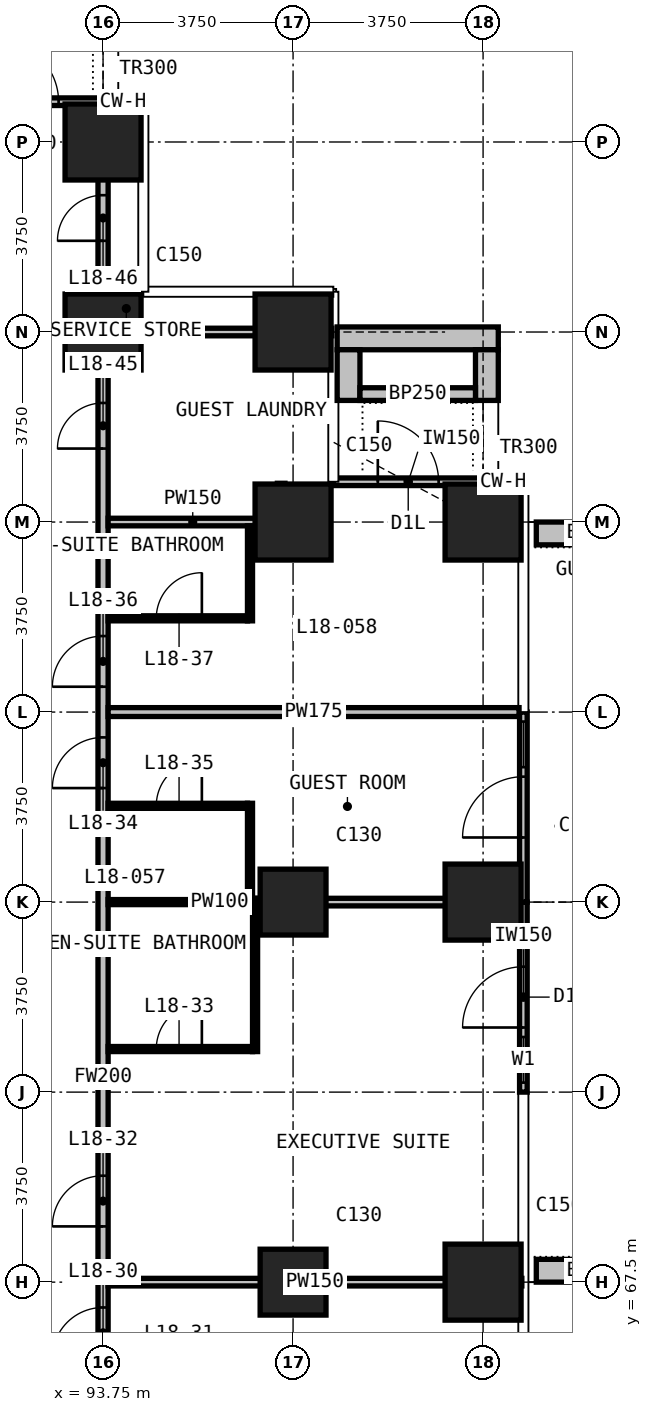
"""IFC4 building model, lengths in metres.
Left out: names, types, materials, properties, quantities, classifications, styles, units other than length and angle.
Written with IfcOpenShell. Run it as: python <this file> out.ifc"""

import sys

from ifc_helpers import new_model, si_unit, direction, frame, frame_2d, origin, origin_2d, place, context, subcontext, project, spatial, rectangle, extrude, element, fill, save


model = new_model("IFC4")
c1 = context("Model", 3, precision=1e-05, world=origin(), true_north=direction((0.0, 1.0)))
c2 = subcontext(c1, "Body", "Model", "MODEL_VIEW")
j1 = project(units=[si_unit("LENGTHUNIT", "METRE"), si_unit("PLANEANGLEUNIT", "RADIAN")], contexts=[c1])
p1 = place(None, origin())
s1 = spatial("IfcSite", under=j1, at=p1, CompositionType="ELEMENT")
p2 = place(p1, origin())
s2 = spatial("IfcBuilding", under=s1, at=p2, CompositionType="ELEMENT")
p3 = place(p2, frame((0.0, 0.0, 79.1)))
s3 = spatial("IfcBuildingStorey", under=s2, at=p3, CompositionType="ELEMENT", Elevation=79.1)
for number, where, z_axis, x_axis in (
    (1, (93.75, 86.25, 0.0), (0.0, 0.0, 1.0), (1.0, 0.0, 0.0)),
    (2, (93.75, 90.0, 0.0), (0.0, 0.0, 1.0), (1.0, 0.0, 0.0)),
):
    element("IfcColumn", number, at=place(p3, frame(where, z_axis=z_axis, x_axis=x_axis)), inside=s3, PredefinedType="COLUMN", context=c2, shape_type="SweptSolid", body=[
        extrude(rectangle(XDim=1.5, YDim=1.5, at=origin_2d()), origin(), (0.0, 0.0, 1.0), 3.3),
    ])
for number, where, z_axis, x_axis in (
    (3, (97.5, 67.5, 0.0), (0.0, 0.0, 1.0), (1.0, 0.0, 0.0)),
    (4, (97.5, 75.0, 0.0), (0.0, 0.0, 1.0), (1.0, 0.0, 0.0)),
):
    element("IfcColumn", number, at=place(p3, frame(where, z_axis=z_axis, x_axis=x_axis)), inside=s3, PredefinedType="COLUMN", context=c2, shape_type="SweptSolid", body=[
        extrude(rectangle(XDim=1.3, YDim=1.3, at=origin_2d()), origin(), (0.0, 0.0, 1.0), 3.3),
    ])
for number, where, z_axis, x_axis in (
    (5, (97.5, 82.5, 0.0), (0.0, 0.0, 1.0), (1.0, 0.0, 0.0)),
    (6, (97.5, 86.25, 0.0), (0.0, 0.0, 1.0), (1.0, 0.0, 0.0)),
    (7, (101.25, 67.5, 0.0), (0.0, 0.0, 1.0), (1.0, 0.0, 0.0)),
    (8, (101.25, 75.0, 0.0), (0.0, 0.0, 1.0), (1.0, 0.0, 0.0)),
    (9, (101.25, 82.5, 0.0), (0.0, 0.0, 1.0), (1.0, 0.0, 0.0)),
):
    element("IfcColumn", number, at=place(p3, frame(where, z_axis=z_axis, x_axis=x_axis)), inside=s3, PredefinedType="COLUMN", context=c2, shape_type="SweptSolid", body=[
        extrude(rectangle(XDim=1.5, YDim=1.5, at=origin_2d()), origin(), (0.0, 0.0, 1.0), 3.3),
    ])
p4 = place(p3, frame((102.045, 71.25, 0.0), z_axis=(0.0, 0.0, 1.0), x_axis=(0.0, 1.0, 0.0)))
e10 = element("IfcWall", 10, at=p4, inside=s3, PredefinedType="SOLIDWALL", context=c2, shape_type="SweptSolid", body=[
    extrude(rectangle(XDim=3.75, YDim=0.15, at=frame_2d((1.875, 0.0))), origin(), (0.0, 0.0, 1.0), 3.0),
])
p5 = place(p4, frame((0.188, 0.0, 0.1)))
e11 = element("IfcOpeningElement", 11, at=p5, cuts=e10, PredefinedType="OPENING", context=c2, shape_type="SweptSolid", body=[
    extrude(rectangle(XDim=0.9, YDim=2.4, at=frame_2d((0.45, 1.2))), frame((0.0, 0.085, 0.0), z_axis=(0.0, -1.0, 0.0), x_axis=(1.0, 0.0, 0.0)), (0.0, 0.0, 1.0), 0.17),
])
p6 = place(p4, frame((1.275, 0.0, 0.0)))
e12 = element("IfcOpeningElement", 12, at=p6, cuts=e10, PredefinedType="OPENING", context=c2, shape_type="SweptSolid", body=[
    extrude(rectangle(XDim=1.2, YDim=2.4, at=frame_2d((0.6, 1.2))), frame((0.0, 0.085, 0.0), z_axis=(0.0, -1.0, 0.0), x_axis=(1.0, 0.0, 0.0)), (0.0, 0.0, 1.0), 0.17),
])
p7 = place(p3, frame((102.045, 75.0, 0.0), z_axis=(0.0, 0.0, 1.0), x_axis=(0.0, 1.0, 0.0)))
e13 = element("IfcWall", 13, at=p7, inside=s3, PredefinedType="SOLIDWALL", context=c2, shape_type="SweptSolid", body=[
    extrude(rectangle(XDim=3.75, YDim=0.15, at=frame_2d((1.875, 0.0))), origin(), (0.0, 0.0, 1.0), 3.0),
])
p8 = place(p7, frame((1.275, 0.0, 0.0)))
e14 = element("IfcOpeningElement", 14, at=p8, cuts=e13, PredefinedType="OPENING", context=c2, shape_type="SweptSolid", body=[
    extrude(rectangle(XDim=1.2, YDim=2.4, at=frame_2d((0.6, 1.2))), frame((0.0, 0.085, 0.0), z_axis=(0.0, -1.0, 0.0), x_axis=(1.0, 0.0, 0.0)), (0.0, 0.0, 1.0), 0.17),
])
p9 = place(p7, frame((2.663, 0.0, 0.1)))
e15 = element("IfcOpeningElement", 15, at=p9, cuts=e13, PredefinedType="OPENING", context=c2, shape_type="SweptSolid", body=[
    extrude(rectangle(XDim=0.9, YDim=2.4, at=frame_2d((0.45, 1.2))), frame((0.0, 0.085, 0.0), z_axis=(0.0, -1.0, 0.0), x_axis=(1.0, 0.0, 0.0)), (0.0, 0.0, 1.0), 0.17),
])
p10 = place(p3, frame((98.295, 83.295, 0.0), z_axis=(0.0, 0.0, 1.0), x_axis=(1.0, 0.0, 0.0)))
e16 = element("IfcWall", 16, at=p10, inside=s3, PredefinedType="SOLIDWALL", context=c2, shape_type="SweptSolid", body=[
    extrude(rectangle(XDim=2.955, YDim=0.15, at=frame_2d((1.478, 0.0))), origin(), (0.0, 0.0, 1.0), 3.0),
])
p11 = place(p10, frame((0.877, 0.0, 0.0)))
e17 = element("IfcOpeningElement", 17, at=p11, cuts=e16, PredefinedType="OPENING", context=c2, shape_type="SweptSolid", body=[
    extrude(rectangle(XDim=1.2, YDim=2.0, at=frame_2d((0.6, 1.0))), frame((0.0, 0.085, 0.0), z_axis=(0.0, -1.0, 0.0), x_axis=(1.0, 0.0, 0.0)), (0.0, 0.0, 1.0), 0.17),
])
p12 = place(p3, frame((90.795, 90.795, 0.0), z_axis=(0.0, 0.0, 1.0), x_axis=(1.0, 0.0, 0.0)))
e18 = element("IfcWall", 18, at=p12, inside=s3, PredefinedType="SOLIDWALL", context=c2, shape_type="SweptSolid", body=[
    extrude(rectangle(XDim=2.955, YDim=0.15, at=frame_2d((1.478, 0.0))), origin(), (0.0, 0.0, 1.0), 3.0),
])
p13 = place(p12, frame((0.877, 0.0, 0.0)))
e19 = element("IfcOpeningElement", 19, at=p13, cuts=e18, PredefinedType="OPENING", context=c2, shape_type="SweptSolid", body=[
    extrude(rectangle(XDim=1.2, YDim=2.4, at=frame_2d((0.6, 1.2))), frame((0.0, 0.085, 0.0), z_axis=(0.0, -1.0, 0.0), x_axis=(1.0, 0.0, 0.0)), (0.0, 0.0, 1.0), 0.17),
])
for number, where, z_axis, x_axis in (
    (20, (102.3, 67.725, 0.0), (0.0, 0.0, 1.0), (1.0, 0.0, 0.0)),
    (21, (102.3, 82.275, 0.0), (0.0, 0.0, 1.0), (1.0, 0.0, 0.0)),
):
    element("IfcWall", number, at=place(p3, frame(where, z_axis=z_axis, x_axis=x_axis)), inside=s3, PredefinedType="USERDEFINED", context=c2, shape_type="SweptSolid", body=[
        extrude(rectangle(XDim=2.35, YDim=0.45, at=frame_2d((1.175, 0.0))), origin(), (0.0, 0.0, 1.0), 1.1),
    ])
p14 = place(p3, frame((98.37, 86.125, 0.0), z_axis=(0.0, 0.0, 1.0), x_axis=(1.0, 0.0, 0.0)))
e22 = element("IfcWall", 22, at=p14, inside=s3, PredefinedType="USERDEFINED", context=c2, shape_type="SweptSolid", body=[
    extrude(rectangle(XDim=3.18, YDim=0.45, at=frame_2d((1.59, 0.0))), origin(), (0.0, 0.0, 1.0), 1.1),
])
for number, where, z_axis, x_axis in (
    (23, (98.595, 84.9, 0.0), (0.0, 0.0, 1.0), (0.0, 1.0, 0.0)),
    (24, (101.325, 84.9, 0.0), (0.0, 0.0, 1.0), (0.0, 1.0, 0.0)),
):
    element("IfcWall", number, at=place(p3, frame(where, z_axis=z_axis, x_axis=x_axis)), inside=s3, PredefinedType="USERDEFINED", context=c2, shape_type="SweptSolid", body=[
        extrude(rectangle(XDim=1.0, YDim=0.45, at=frame_2d((0.5, 0.0))), origin(), (0.0, 0.0, 1.0), 1.1),
    ])
p15 = place(p3, frame((98.82, 85.025, 0.0), z_axis=(0.0, 0.0, 1.0), x_axis=(1.0, 0.0, 0.0)))
e25 = element("IfcWall", 25, at=p15, inside=s3, PredefinedType="USERDEFINED", context=c2, shape_type="SweptSolid", body=[
    extrude(rectangle(XDim=2.28, YDim=0.25, at=frame_2d((1.14, 0.0))), origin(), (0.0, 0.0, 1.0), 1.0),
])
p16 = place(p3, frame((93.75, 52.4, 0.0), z_axis=(0.0, 0.0, 1.0), x_axis=(0.0, 1.0, 0.0)))
e26 = element("IfcWall", 26, at=p16, inside=s3, PredefinedType="PARTITIONING", context=c2, shape_type="SweptSolid", body=[
    extrude(rectangle(XDim=38.31, YDim=0.2, at=frame_2d((19.155, 0.0))), origin(), (0.0, 0.0, 1.0), 3.0),
])
p17 = place(p16, frame((5.5, 0.0, 0.0)))
e27 = element("IfcOpeningElement", 27, at=p17, cuts=e26, PredefinedType="OPENING", context=c2, shape_type="SweptSolid", body=[
    extrude(rectangle(XDim=1.0, YDim=2.2, at=frame_2d((0.5, 1.1))), frame((0.0, 0.11, 0.0), z_axis=(0.0, -1.0, 0.0), x_axis=(1.0, 0.0, 0.0)), (0.0, 0.0, 1.0), 0.22),
])
p18 = place(p16, frame((8.1, 0.0, 0.0)))
e28 = element("IfcOpeningElement", 28, at=p18, cuts=e26, PredefinedType="OPENING", context=c2, shape_type="SweptSolid", body=[
    extrude(rectangle(XDim=1.0, YDim=2.2, at=frame_2d((0.5, 1.1))), frame((0.0, 0.11, 0.0), z_axis=(0.0, -1.0, 0.0), x_axis=(1.0, 0.0, 0.0)), (0.0, 0.0, 1.0), 0.22),
])
p19 = place(p16, frame((13.6, 0.0, 0.0)))
e29 = element("IfcOpeningElement", 29, at=p19, cuts=e26, PredefinedType="OPENING", context=c2, shape_type="SweptSolid", body=[
    extrude(rectangle(XDim=1.0, YDim=2.2, at=frame_2d((0.5, 1.1))), frame((0.0, 0.11, 0.0), z_axis=(0.0, -1.0, 0.0), x_axis=(1.0, 0.0, 0.0)), (0.0, 0.0, 1.0), 0.22),
])
p20 = place(p16, frame((16.2, 0.0, 0.0)))
e30 = element("IfcOpeningElement", 30, at=p20, cuts=e26, PredefinedType="OPENING", context=c2, shape_type="SweptSolid", body=[
    extrude(rectangle(XDim=1.0, YDim=2.2, at=frame_2d((0.5, 1.1))), frame((0.0, 0.11, 0.0), z_axis=(0.0, -1.0, 0.0), x_axis=(1.0, 0.0, 0.0)), (0.0, 0.0, 1.0), 0.22),
])
p21 = place(p16, frame((24.85, 0.0, 0.0)))
e31 = element("IfcOpeningElement", 31, at=p21, cuts=e26, PredefinedType="OPENING", context=c2, shape_type="SweptSolid", body=[
    extrude(rectangle(XDim=1.0, YDim=2.2, at=frame_2d((0.5, 1.1))), frame((0.0, 0.11, 0.0), z_axis=(0.0, -1.0, 0.0), x_axis=(1.0, 0.0, 0.0)), (0.0, 0.0, 1.0), 0.22),
])
p22 = place(p16, frame((26.85, 0.0, 0.0)))
e32 = element("IfcOpeningElement", 32, at=p22, cuts=e26, PredefinedType="OPENING", context=c2, shape_type="SweptSolid", body=[
    extrude(rectangle(XDim=1.0, YDim=2.2, at=frame_2d((0.5, 1.1))), frame((0.0, 0.11, 0.0), z_axis=(0.0, -1.0, 0.0), x_axis=(1.0, 0.0, 0.0)), (0.0, 0.0, 1.0), 0.22),
])
p23 = place(p16, frame((31.55, 0.0, 0.0)))
e33 = element("IfcOpeningElement", 33, at=p23, cuts=e26, PredefinedType="OPENING", context=c2, shape_type="SweptSolid", body=[
    extrude(rectangle(XDim=0.9, YDim=2.2, at=frame_2d((0.45, 1.1))), frame((0.0, 0.11, 0.0), z_axis=(0.0, -1.0, 0.0), x_axis=(1.0, 0.0, 0.0)), (0.0, 0.0, 1.0), 0.22),
])
p24 = place(p16, frame((35.65, 0.0, 0.0)))
e34 = element("IfcOpeningElement", 34, at=p24, cuts=e26, PredefinedType="OPENING", context=c2, shape_type="SweptSolid", body=[
    extrude(rectangle(XDim=0.9, YDim=2.2, at=frame_2d((0.45, 1.1))), frame((0.0, 0.11, 0.0), z_axis=(0.0, -1.0, 0.0), x_axis=(1.0, 0.0, 0.0)), (0.0, 0.0, 1.0), 0.22),
])
p25 = place(p3, frame((93.85, 78.75, 0.0), z_axis=(0.0, 0.0, 1.0), x_axis=(1.0, 0.0, 0.0)))
e35 = element("IfcWall", 35, at=p25, inside=s3, PredefinedType="PARTITIONING", context=c2, shape_type="SweptSolid", body=[
    extrude(rectangle(XDim=8.11, YDim=0.175, at=frame_2d((4.055, 0.0))), origin(), (0.0, 0.0, 1.0), 3.0),
])
p26 = place(p3, frame((93.85, 67.5, 0.0), z_axis=(0.0, 0.0, 1.0), x_axis=(1.0, 0.0, 0.0)))
e36 = element("IfcWall", 36, at=p26, inside=s3, PredefinedType="PARTITIONING", context=c2, shape_type="SweptSolid", body=[
    extrude(rectangle(XDim=8.165, YDim=0.15, at=frame_2d((4.083, 0.0))), origin(), (0.0, 0.0, 1.0), 3.0),
])
p27 = place(p3, frame((96.8, 75.0, 0.0), z_axis=(0.0, 0.0, 1.0), x_axis=(1.0, 0.0, 0.0)))
e37 = element("IfcWall", 37, at=p27, inside=s3, PredefinedType="PARTITIONING", context=c2, shape_type="SweptSolid", body=[
    extrude(rectangle(XDim=5.16, YDim=0.15, at=frame_2d((2.58, 0.0))), origin(), (0.0, 0.0, 1.0), 3.0),
])
p28 = place(p3, frame((93.85, 82.5, 0.0), z_axis=(0.0, 0.0, 1.0), x_axis=(1.0, 0.0, 0.0)))
e38 = element("IfcWall", 38, at=p28, inside=s3, PredefinedType="PARTITIONING", context=c2, shape_type="SweptSolid", body=[
    extrude(rectangle(XDim=3.34, YDim=0.15, at=frame_2d((1.67, 0.0))), origin(), (0.0, 0.0, 1.0), 3.0),
])
p29 = place(p3, frame((93.85, 86.25, 0.0), z_axis=(0.0, 0.0, 1.0), x_axis=(1.0, 0.0, 0.0)))
e39 = element("IfcWall", 39, at=p29, inside=s3, PredefinedType="PARTITIONING", context=c2, shape_type="SweptSolid", body=[
    extrude(rectangle(XDim=4.415, YDim=0.15, at=frame_2d((2.208, 0.0))), origin(), (0.0, 0.0, 1.0), 3.0),
])
p30 = place(p3, frame((97.265, 82.425, 0.0), z_axis=(0.0, 0.0, 1.0), x_axis=(0.0, 1.0, 0.0)))
e40 = element("IfcWall", 40, at=p30, inside=s3, PredefinedType="PARTITIONING", context=c2, shape_type="SweptSolid", body=[
    extrude(rectangle(XDim=0.84, YDim=0.15, at=frame_2d((0.42, 0.0))), origin(), (0.0, 0.0, 1.0), 3.0),
])
p31 = place(p3, frame((93.85, 72.1, 0.0), z_axis=(0.0, 0.0, 1.0), x_axis=(1.0, 0.0, 0.0)))
e41 = element("IfcWall", 41, at=p31, inside=s3, PredefinedType="PARTITIONING", context=c2, shape_type="SweptSolid", body=[
    extrude(rectangle(XDim=2.85, YDim=0.1, at=frame_2d((1.425, 0.0))), origin(), (0.0, 0.0, 1.0), 3.0),
])
p32 = place(p31, frame((0.95, 0.0, 0.0)))
e42 = element("IfcOpeningElement", 42, at=p32, cuts=e41, PredefinedType="OPENING", context=c2, shape_type="SweptSolid", body=[
    extrude(rectangle(XDim=0.9, YDim=2.2, at=frame_2d((0.45, 1.1))), frame((0.0, 0.06, 0.0), z_axis=(0.0, -1.0, 0.0), x_axis=(1.0, 0.0, 0.0)), (0.0, 0.0, 1.0), 0.12),
])
p33 = place(p3, frame((93.85, 75.0, 0.0), z_axis=(0.0, 0.0, 1.0), x_axis=(1.0, 0.0, 0.0)))
e43 = element("IfcWall", 43, at=p33, inside=s3, PredefinedType="PARTITIONING", context=c2, shape_type="SweptSolid", body=[
    extrude(rectangle(XDim=2.75, YDim=0.1, at=frame_2d((1.375, 0.0))), origin(), (0.0, 0.0, 1.0), 3.0),
])
p34 = place(p3, frame((93.85, 76.9, 0.0), z_axis=(0.0, 0.0, 1.0), x_axis=(1.0, 0.0, 0.0)))
e44 = element("IfcWall", 44, at=p34, inside=s3, PredefinedType="PARTITIONING", context=c2, shape_type="SweptSolid", body=[
    extrude(rectangle(XDim=2.75, YDim=0.1, at=frame_2d((1.375, 0.0))), origin(), (0.0, 0.0, 1.0), 3.0),
])
p35 = place(p34, frame((0.95, 0.0, 0.0)))
e45 = element("IfcOpeningElement", 45, at=p35, cuts=e44, PredefinedType="OPENING", context=c2, shape_type="SweptSolid", body=[
    extrude(rectangle(XDim=0.9, YDim=2.2, at=frame_2d((0.45, 1.1))), frame((0.0, 0.06, 0.0), z_axis=(0.0, -1.0, 0.0), x_axis=(1.0, 0.0, 0.0)), (0.0, 0.0, 1.0), 0.12),
])
p36 = place(p3, frame((93.85, 80.6, 0.0), z_axis=(0.0, 0.0, 1.0), x_axis=(1.0, 0.0, 0.0)))
e46 = element("IfcWall", 46, at=p36, inside=s3, PredefinedType="PARTITIONING", context=c2, shape_type="SweptSolid", body=[
    extrude(rectangle(XDim=2.75, YDim=0.1, at=frame_2d((1.375, 0.0))), origin(), (0.0, 0.0, 1.0), 3.0),
])
p37 = place(p36, frame((0.95, 0.0, 0.0)))
e47 = element("IfcOpeningElement", 47, at=p37, cuts=e46, PredefinedType="OPENING", context=c2, shape_type="SweptSolid", body=[
    extrude(rectangle(XDim=0.9, YDim=2.2, at=frame_2d((0.45, 1.1))), frame((0.0, 0.06, 0.0), z_axis=(0.0, -1.0, 0.0), x_axis=(1.0, 0.0, 0.0)), (0.0, 0.0, 1.0), 0.12),
])
p38 = place(p3, frame((96.65, 74.95, 0.0), z_axis=(0.0, 0.0, 1.0), x_axis=(0.0, 1.0, 0.0)))
e48 = element("IfcWall", 48, at=p38, inside=s3, PredefinedType="PARTITIONING", context=c2, shape_type="SweptSolid", body=[
    extrude(rectangle(XDim=2.0, YDim=0.1, at=frame_2d((1.0, 0.0))), origin(), (0.0, 0.0, 1.0), 3.0),
])
p39 = place(p3, frame((96.65, 80.55, 0.0), z_axis=(0.0, 0.0, 1.0), x_axis=(0.0, 1.0, 0.0)))
e49 = element("IfcWall", 49, at=p39, inside=s3, PredefinedType="PARTITIONING", context=c2, shape_type="SweptSolid", body=[
    extrude(rectangle(XDim=1.875, YDim=0.1, at=frame_2d((0.938, 0.0))), origin(), (0.0, 0.0, 1.0), 3.0),
])
p40 = place(p3, frame((96.75, 72.05, 0.0), z_axis=(0.0, 0.0, 1.0), x_axis=(0.0, 1.0, 0.0)))
e50 = element("IfcWall", 50, at=p40, inside=s3, PredefinedType="PARTITIONING", context=c2, shape_type="SweptSolid", body=[
    extrude(rectangle(XDim=3.025, YDim=0.1, at=frame_2d((1.512, 0.0))), origin(), (0.0, 0.0, 1.0), 3.0),
])
p41 = place(p5, origin())
e51 = element("IfcWindow", 51, at=p41, inside=s3, PartitioningType="SINGLE_PANEL", PredefinedType="WINDOW", context=c2, shape_type="SweptSolid", body=[
    extrude(rectangle(XDim=0.9, YDim=2.4, at=frame_2d((0.45, 1.2))), frame((0.0, 0.03, 0.0), z_axis=(0.0, -1.0, 0.0), x_axis=(1.0, 0.0, 0.0)), (0.0, 0.0, 1.0), 0.06),
])
fill(e11, e51)
p42 = place(p6, origin())
e52 = element("IfcDoor", 52, at=p42, inside=s3, OperationType="SINGLE_SWING_LEFT", PredefinedType="DOOR", context=c2, shape_type="SweptSolid", body=[
    extrude(rectangle(XDim=1.2, YDim=2.4, at=frame_2d((0.6, 1.2))), frame((0.0, 0.025, 0.0), z_axis=(0.0, -1.0, 0.0), x_axis=(1.0, 0.0, 0.0)), (0.0, 0.0, 1.0), 0.05),
])
fill(e12, e52)
p43 = place(p8, origin())
e53 = element("IfcDoor", 53, at=p43, inside=s3, OperationType="SINGLE_SWING_LEFT", PredefinedType="DOOR", context=c2, shape_type="SweptSolid", body=[
    extrude(rectangle(XDim=1.2, YDim=2.4, at=frame_2d((0.6, 1.2))), frame((0.0, 0.025, 0.0), z_axis=(0.0, -1.0, 0.0), x_axis=(1.0, 0.0, 0.0)), (0.0, 0.0, 1.0), 0.05),
])
fill(e14, e53)
p44 = place(p9, origin())
e54 = element("IfcWindow", 54, at=p44, inside=s3, PartitioningType="SINGLE_PANEL", PredefinedType="WINDOW", context=c2, shape_type="SweptSolid", body=[
    extrude(rectangle(XDim=0.9, YDim=2.4, at=frame_2d((0.45, 1.2))), frame((0.0, 0.03, 0.0), z_axis=(0.0, -1.0, 0.0), x_axis=(1.0, 0.0, 0.0)), (0.0, 0.0, 1.0), 0.06),
])
fill(e15, e54)
p45 = place(p11, origin())
e55 = element("IfcDoor", 55, at=p45, inside=s3, OperationType="SINGLE_SWING_LEFT", PredefinedType="DOOR", context=c2, shape_type="SweptSolid", body=[
    extrude(rectangle(XDim=1.2, YDim=2.0, at=frame_2d((0.6, 1.0))), frame((0.0, 0.025, 0.0), z_axis=(0.0, -1.0, 0.0), x_axis=(1.0, 0.0, 0.0)), (0.0, 0.0, 1.0), 0.05),
])
fill(e17, e55)
p46 = place(p13, origin())
e56 = element("IfcDoor", 56, at=p46, inside=s3, OperationType="SINGLE_SWING_LEFT", PredefinedType="DOOR", context=c2, shape_type="SweptSolid", body=[
    extrude(rectangle(XDim=1.2, YDim=2.4, at=frame_2d((0.6, 1.2))), frame((0.0, 0.025, 0.0), z_axis=(0.0, -1.0, 0.0), x_axis=(1.0, 0.0, 0.0)), (0.0, 0.0, 1.0), 0.05),
])
fill(e19, e56)
p47 = place(p19, origin())
e57 = element("IfcDoor", 57, at=p47, inside=s3, OperationType="SINGLE_SWING_LEFT", PredefinedType="DOOR", context=c2, shape_type="SweptSolid", body=[
    extrude(rectangle(XDim=1.0, YDim=2.2, at=frame_2d((0.5, 1.1))), frame((0.0, 0.025, 0.0), z_axis=(0.0, -1.0, 0.0), x_axis=(1.0, 0.0, 0.0)), (0.0, 0.0, 1.0), 0.05),
])
fill(e29, e57)
p48 = place(p20, origin())
e58 = element("IfcDoor", 58, at=p48, inside=s3, OperationType="SINGLE_SWING_LEFT", PredefinedType="DOOR", context=c2, shape_type="SweptSolid", body=[
    extrude(rectangle(XDim=1.0, YDim=2.2, at=frame_2d((0.5, 1.1))), frame((0.0, 0.025, 0.0), z_axis=(0.0, -1.0, 0.0), x_axis=(1.0, 0.0, 0.0)), (0.0, 0.0, 1.0), 0.05),
])
fill(e30, e58)
p49 = place(p32, origin())
e59 = element("IfcDoor", 59, at=p49, inside=s3, OperationType="SINGLE_SWING_RIGHT", PredefinedType="DOOR", context=c2, shape_type="SweptSolid", body=[
    extrude(rectangle(XDim=0.9, YDim=2.2, at=frame_2d((0.45, 1.1))), frame((0.0, 0.025, 0.0), z_axis=(0.0, -1.0, 0.0), x_axis=(1.0, 0.0, 0.0)), (0.0, 0.0, 1.0), 0.05),
])
fill(e42, e59)
p50 = place(p21, origin())
e60 = element("IfcDoor", 60, at=p50, inside=s3, OperationType="SINGLE_SWING_LEFT", PredefinedType="DOOR", context=c2, shape_type="SweptSolid", body=[
    extrude(rectangle(XDim=1.0, YDim=2.2, at=frame_2d((0.5, 1.1))), frame((0.0, 0.025, 0.0), z_axis=(0.0, -1.0, 0.0), x_axis=(1.0, 0.0, 0.0)), (0.0, 0.0, 1.0), 0.05),
])
fill(e31, e60)
p51 = place(p35, origin())
e61 = element("IfcDoor", 61, at=p51, inside=s3, OperationType="SINGLE_SWING_RIGHT", PredefinedType="DOOR", context=c2, shape_type="SweptSolid", body=[
    extrude(rectangle(XDim=0.9, YDim=2.2, at=frame_2d((0.45, 1.1))), frame((0.0, 0.025, 0.0), z_axis=(0.0, -1.0, 0.0), x_axis=(1.0, 0.0, 0.0)), (0.0, 0.0, 1.0), 0.05),
])
fill(e45, e61)
p52 = place(p22, origin())
e62 = element("IfcDoor", 62, at=p52, inside=s3, OperationType="SINGLE_SWING_RIGHT", PredefinedType="DOOR", context=c2, shape_type="SweptSolid", body=[
    extrude(rectangle(XDim=1.0, YDim=2.2, at=frame_2d((0.5, 1.1))), frame((0.0, 0.025, 0.0), z_axis=(0.0, -1.0, 0.0), x_axis=(1.0, 0.0, 0.0)), (0.0, 0.0, 1.0), 0.05),
])
fill(e32, e62)
p53 = place(p37, origin())
e63 = element("IfcDoor", 63, at=p53, inside=s3, OperationType="SINGLE_SWING_RIGHT", PredefinedType="DOOR", context=c2, shape_type="SweptSolid", body=[
    extrude(rectangle(XDim=0.9, YDim=2.2, at=frame_2d((0.45, 1.1))), frame((0.0, 0.025, 0.0), z_axis=(0.0, -1.0, 0.0), x_axis=(1.0, 0.0, 0.0)), (0.0, 0.0, 1.0), 0.05),
])
fill(e47, e63)
p54 = place(p23, origin())
e64 = element("IfcDoor", 64, at=p54, inside=s3, OperationType="SINGLE_SWING_LEFT", PredefinedType="DOOR", context=c2, shape_type="SweptSolid", body=[
    extrude(rectangle(XDim=0.9, YDim=2.2, at=frame_2d((0.45, 1.1))), frame((0.0, 0.025, 0.0), z_axis=(0.0, -1.0, 0.0), x_axis=(1.0, 0.0, 0.0)), (0.0, 0.0, 1.0), 0.05),
])
fill(e33, e64)
p55 = place(p24, origin())
e65 = element("IfcDoor", 65, at=p55, inside=s3, OperationType="SINGLE_SWING_LEFT", PredefinedType="DOOR", context=c2, shape_type="SweptSolid", body=[
    extrude(rectangle(XDim=0.9, YDim=2.2, at=frame_2d((0.45, 1.1))), frame((0.0, 0.025, 0.0), z_axis=(0.0, -1.0, 0.0), x_axis=(1.0, 0.0, 0.0)), (0.0, 0.0, 1.0), 0.05),
])
fill(e34, e65)
save(model, sys.argv[1])
